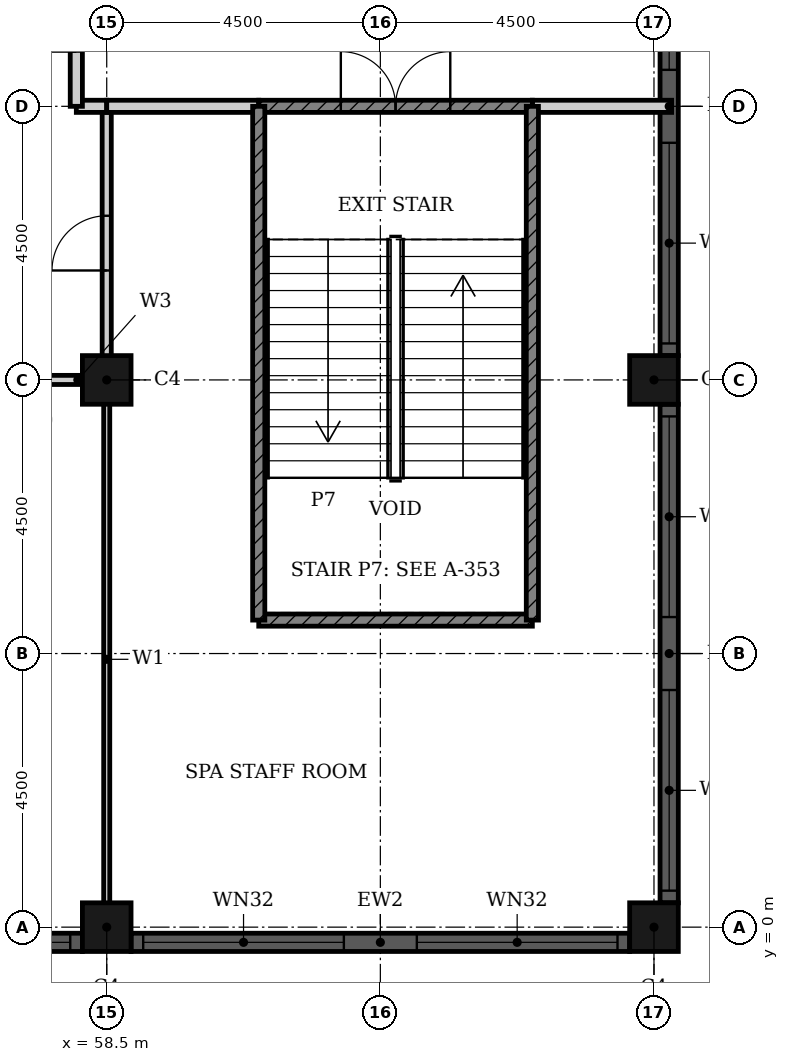
"""IFC4 building model, lengths in metres.
Left out: names, types, materials, properties, quantities, classifications, styles, units other than length and angle.
Written with IfcOpenShell. Run it as: python <this file> out.ifc"""

import sys

from ifc_helpers import new_model, si_unit, direction, frame, frame_2d, origin, origin_2d, place, context, subcontext, project, spatial, rectangle, hollow_rectangle, extrude, element, fill, save


model = new_model("IFC4")
c1 = context("Model", 3, precision=1e-05, world=origin(), true_north=direction((0.0, 1.0)))
c2 = subcontext(c1, "Body", "Model", "MODEL_VIEW")
j1 = project(units=[si_unit("LENGTHUNIT", "METRE"), si_unit("PLANEANGLEUNIT", "RADIAN")], contexts=[c1])
p1 = place(None, origin())
s1 = spatial("IfcSite", under=j1, at=p1, CompositionType="ELEMENT")
p2 = place(p1, origin())
s2 = spatial("IfcBuilding", under=s1, at=p2, CompositionType="ELEMENT")
p3 = place(p2, frame((0.0, 0.0, 24.0)))
s3 = spatial("IfcBuildingStorey", under=s2, at=p3, CompositionType="ELEMENT", Elevation=24.0)
for number, where, z_axis, x_axis in (
    (1, (58.5, 0.0, 0.0), (0.0, 0.0, 1.0), (1.0, 0.0, 0.0)),
    (2, (67.5, 0.0, 0.0), (0.0, 0.0, 1.0), (1.0, 0.0, 0.0)),
    (3, (67.5, 9.0, 0.0), (0.0, 0.0, 1.0), (1.0, 0.0, 0.0)),
    (4, (58.5, 9.0, 0.0), (0.0, 0.0, 1.0), (1.0, 0.0, 0.0)),
):
    element("IfcColumn", number, at=place(p3, frame(where, z_axis=z_axis, x_axis=x_axis)), inside=s3, PredefinedType="COLUMN", context=c2, shape_type="SweptSolid", body=[
        extrude(hollow_rectangle(XDim=0.8, YDim=0.8, WallThickness=0.025, at=origin_2d()), origin(), (0.0, 0.0, 1.0), 4.8),
    ])
p4 = place(p3, frame((67.75, 0.4, 0.0), z_axis=(0.0, 0.0, 1.0), x_axis=(0.0, 1.0, 0.0)))
e5 = element("IfcWall", 5, at=p4, inside=s3, PredefinedType="SOLIDWALL", context=c2, shape_type="SweptSolid", body=[
    extrude(rectangle(XDim=8.2, YDim=0.3, at=frame_2d((4.1, 0.0))), origin(), (0.0, 0.0, 1.0), 4.8),
])
p5 = place(p4, frame((0.2, 0.0, 0.9)))
e6 = element("IfcOpeningElement", 6, at=p5, cuts=e5, PredefinedType="OPENING", context=c2, shape_type="SweptSolid", body=[
    extrude(rectangle(XDim=3.3, YDim=2.9, at=frame_2d((1.65, 1.45))), frame((0.0, 0.16, 0.0), z_axis=(0.0, -1.0, 0.0), x_axis=(1.0, 0.0, 0.0)), (0.0, 0.0, 1.0), 0.32),
])
p6 = place(p4, frame((4.7, 0.0, 0.9)))
e7 = element("IfcOpeningElement", 7, at=p6, cuts=e5, PredefinedType="OPENING", context=c2, shape_type="SweptSolid", body=[
    extrude(rectangle(XDim=3.3, YDim=2.9, at=frame_2d((1.65, 1.45))), frame((0.0, 0.16, 0.0), z_axis=(0.0, -1.0, 0.0), x_axis=(1.0, 0.0, 0.0)), (0.0, 0.0, 1.0), 0.32),
])
p7 = place(p3, frame((67.75, 9.4, 0.0), z_axis=(0.0, 0.0, 1.0), x_axis=(0.0, 1.0, 0.0)))
e8 = element("IfcWall", 8, at=p7, inside=s3, PredefinedType="SOLIDWALL", context=c2, shape_type="SweptSolid", body=[
    extrude(rectangle(XDim=8.2, YDim=0.3, at=frame_2d((4.1, 0.0))), origin(), (0.0, 0.0, 1.0), 4.8),
])
p8 = place(p7, frame((0.2, 0.0, 0.9)))
e9 = element("IfcOpeningElement", 9, at=p8, cuts=e8, PredefinedType="OPENING", context=c2, shape_type="SweptSolid", body=[
    extrude(rectangle(XDim=3.3, YDim=2.9, at=frame_2d((1.65, 1.45))), frame((0.0, 0.16, 0.0), z_axis=(0.0, -1.0, 0.0), x_axis=(1.0, 0.0, 0.0)), (0.0, 0.0, 1.0), 0.32),
])
p9 = place(p7, frame((4.7, 0.0, 0.9)))
e10 = element("IfcOpeningElement", 10, at=p9, cuts=e8, PredefinedType="OPENING", context=c2, shape_type="SweptSolid", body=[
    extrude(rectangle(XDim=3.3, YDim=2.9, at=frame_2d((1.65, 1.45))), frame((0.0, 0.16, 0.0), z_axis=(0.0, -1.0, 0.0), x_axis=(1.0, 0.0, 0.0)), (0.0, 0.0, 1.0), 0.32),
])
p10 = place(p3, frame((49.9, -0.25, 0.0), z_axis=(0.0, 0.0, 1.0), x_axis=(1.0, 0.0, 0.0)))
e11 = element("IfcWall", 11, at=p10, inside=s3, PredefinedType="SOLIDWALL", context=c2, shape_type="SweptSolid", body=[
    extrude(rectangle(XDim=8.2, YDim=0.3, at=frame_2d((4.1, 0.0))), origin(), (0.0, 0.0, 1.0), 4.8),
])
p11 = place(p10, frame((0.2, 0.0, 0.9)))
e12 = element("IfcOpeningElement", 12, at=p11, cuts=e11, PredefinedType="OPENING", context=c2, shape_type="SweptSolid", body=[
    extrude(rectangle(XDim=3.3, YDim=2.9, at=frame_2d((1.65, 1.45))), frame((0.0, 0.16, 0.0), z_axis=(0.0, -1.0, 0.0), x_axis=(1.0, 0.0, 0.0)), (0.0, 0.0, 1.0), 0.32),
])
p12 = place(p10, frame((4.7, 0.0, 0.9)))
e13 = element("IfcOpeningElement", 13, at=p12, cuts=e11, PredefinedType="OPENING", context=c2, shape_type="SweptSolid", body=[
    extrude(rectangle(XDim=3.3, YDim=2.9, at=frame_2d((1.65, 1.45))), frame((0.0, 0.16, 0.0), z_axis=(0.0, -1.0, 0.0), x_axis=(1.0, 0.0, 0.0)), (0.0, 0.0, 1.0), 0.32),
])
p13 = place(p3, frame((58.9, -0.25, 0.0), z_axis=(0.0, 0.0, 1.0), x_axis=(1.0, 0.0, 0.0)))
e14 = element("IfcWall", 14, at=p13, inside=s3, PredefinedType="SOLIDWALL", context=c2, shape_type="SweptSolid", body=[
    extrude(rectangle(XDim=8.2, YDim=0.3, at=frame_2d((4.1, 0.0))), origin(), (0.0, 0.0, 1.0), 4.8),
])
p14 = place(p13, frame((0.2, 0.0, 0.9)))
e15 = element("IfcOpeningElement", 15, at=p14, cuts=e14, PredefinedType="OPENING", context=c2, shape_type="SweptSolid", body=[
    extrude(rectangle(XDim=3.3, YDim=2.9, at=frame_2d((1.65, 1.45))), frame((0.0, 0.16, 0.0), z_axis=(0.0, -1.0, 0.0), x_axis=(1.0, 0.0, 0.0)), (0.0, 0.0, 1.0), 0.32),
])
p15 = place(p13, frame((4.7, 0.0, 0.9)))
e16 = element("IfcOpeningElement", 16, at=p15, cuts=e14, PredefinedType="OPENING", context=c2, shape_type="SweptSolid", body=[
    extrude(rectangle(XDim=3.3, YDim=2.9, at=frame_2d((1.65, 1.45))), frame((0.0, 0.16, 0.0), z_axis=(0.0, -1.0, 0.0), x_axis=(1.0, 0.0, 0.0)), (0.0, 0.0, 1.0), 0.32),
])
p16 = place(p3, frame((55.4, 9.0, 0.0), z_axis=(0.0, 0.0, 1.0), x_axis=(1.0, 0.0, 0.0)))
e17 = element("IfcWall", 17, at=p16, inside=s3, PredefinedType="PARTITIONING", context=c2, shape_type="SweptSolid", body=[
    extrude(rectangle(XDim=3.1, YDim=0.15, at=frame_2d((1.55, 0.0))), origin(), (0.0, 0.0, 1.0), 4.45),
])
p17 = place(p16, frame((0.95, 0.0, 0.0)))
e18 = element("IfcOpeningElement", 18, at=p17, cuts=e17, PredefinedType="OPENING", context=c2, shape_type="SweptSolid", body=[
    extrude(rectangle(XDim=1.2, YDim=2.4, at=frame_2d((0.6, 1.2))), frame((0.0, 0.085, 0.0), z_axis=(0.0, -1.0, 0.0), x_axis=(1.0, 0.0, 0.0)), (0.0, 0.0, 1.0), 0.17),
])
p18 = place(p3, frame((58.5, 9.0, 0.0), z_axis=(0.0, 0.0, 1.0), x_axis=(0.0, 1.0, 0.0)))
e19 = element("IfcWall", 19, at=p18, inside=s3, PredefinedType="PARTITIONING", context=c2, shape_type="SweptSolid", body=[
    extrude(rectangle(XDim=4.5, YDim=0.15, at=frame_2d((2.25, 0.0))), origin(), (0.0, 0.0, 1.0), 4.45),
])
p19 = place(p18, frame((1.8, 0.0, 0.0)))
e20 = element("IfcOpeningElement", 20, at=p19, cuts=e19, PredefinedType="OPENING", context=c2, shape_type="SweptSolid", body=[
    extrude(rectangle(XDim=0.9, YDim=2.1, at=frame_2d((0.45, 1.05))), frame((0.0, 0.085, 0.0), z_axis=(0.0, -1.0, 0.0), x_axis=(1.0, 0.0, 0.0)), (0.0, 0.0, 1.0), 0.17),
])
p20 = place(p3, frame((58.5, -0.19, 0.0), z_axis=(0.0, 0.0, 1.0), x_axis=(0.0, 1.0, 0.0)))
e21 = element("IfcWall", 21, at=p20, inside=s3, PredefinedType="PARTITIONING", context=c2, shape_type="SweptSolid", body=[
    extrude(rectangle(XDim=9.19, YDim=0.1, at=frame_2d((4.595, 0.0))), origin(), (0.0, 0.0, 1.0), 4.45),
])
p21 = place(p3, frame((58.0, 13.5, 0.0), z_axis=(0.0, 0.0, 1.0), x_axis=(1.0, 0.0, 0.0)))
e22 = element("IfcWall", 22, at=p21, inside=s3, PredefinedType="PARTITIONING", context=c2, shape_type="SweptSolid", body=[
    extrude(rectangle(XDim=0.5, YDim=0.2, at=frame_2d((0.25, 0.0))), origin(), (0.0, 0.0, 1.0), 4.45),
])
p22 = place(p3, frame((58.5, 13.5, 0.0), z_axis=(0.0, 0.0, 1.0), x_axis=(1.0, 0.0, 0.0)))
e23 = element("IfcWall", 23, at=p22, inside=s3, PredefinedType="PARTITIONING", context=c2, shape_type="SweptSolid", body=[
    extrude(rectangle(XDim=2.5, YDim=0.2, at=frame_2d((1.25, 0.0))), origin(), (0.0, 0.0, 1.0), 4.45),
])
p23 = place(p3, frame((65.5, 13.5, 0.0), z_axis=(0.0, 0.0, 1.0), x_axis=(1.0, 0.0, 0.0)))
e24 = element("IfcWall", 24, at=p23, inside=s3, PredefinedType="PARTITIONING", context=c2, shape_type="SweptSolid", body=[
    extrude(rectangle(XDim=2.29, YDim=0.2, at=frame_2d((1.145, 0.0))), origin(), (0.0, 0.0, 1.0), 4.45),
])
p24 = place(p3, frame((58.0, 13.5, 0.0), z_axis=(0.0, 0.0, 1.0), x_axis=(0.0, 1.0, 0.0)))
e25 = element("IfcWall", 25, at=p24, inside=s3, PredefinedType="PARTITIONING", context=c2, shape_type="SweptSolid", body=[
    extrude(rectangle(XDim=3.0, YDim=0.2, at=frame_2d((1.5, 0.0))), origin(), (0.0, 0.0, 1.0), 4.45),
])
p25 = place(p24, frame((0.9, 0.0, 0.0)))
e26 = element("IfcOpeningElement", 26, at=p25, cuts=e25, PredefinedType="OPENING", context=c2, shape_type="SweptSolid", body=[
    extrude(rectangle(XDim=1.2, YDim=2.1, at=frame_2d((0.6, 1.05))), frame((0.0, 0.11, 0.0), z_axis=(0.0, -1.0, 0.0), x_axis=(1.0, 0.0, 0.0)), (0.0, 0.0, 1.0), 0.22),
])
p26 = place(p3, frame((61.0, 13.5, 0.0), z_axis=(0.0, 0.0, 1.0), x_axis=(1.0, 0.0, 0.0)))
e27 = element("IfcWall", 27, at=p26, inside=s3, PredefinedType="SHEAR", context=c2, shape_type="SweptSolid", body=[
    extrude(rectangle(XDim=4.5, YDim=0.2, at=frame_2d((2.25, 0.0))), origin(), (0.0, 0.0, 1.0), 4.45),
])
p27 = place(p26, frame((1.35, 0.0, 0.0)))
e28 = element("IfcOpeningElement", 28, at=p27, cuts=e27, PredefinedType="OPENING", context=c2, shape_type="SweptSolid", body=[
    extrude(rectangle(XDim=1.8, YDim=2.1, at=frame_2d((0.9, 1.05))), frame((0.0, 0.11, 0.0), z_axis=(0.0, -1.0, 0.0), x_axis=(1.0, 0.0, 0.0)), (0.0, 0.0, 1.0), 0.22),
])
p28 = place(p3, frame((61.0, 5.05, 0.0), z_axis=(0.0, 0.0, 1.0), x_axis=(1.0, 0.0, 0.0)))
e29 = element("IfcWall", 29, at=p28, inside=s3, PredefinedType="SHEAR", context=c2, shape_type="SweptSolid", body=[
    extrude(rectangle(XDim=4.5, YDim=0.2, at=frame_2d((2.25, 0.0))), origin(), (0.0, 0.0, 1.0), 4.45),
])
for number, where, z_axis, x_axis in (
    (30, (61.0, 5.05, 0.0), (0.0, 0.0, 1.0), (0.0, 1.0, 0.0)),
    (31, (65.5, 5.05, 0.0), (0.0, 0.0, 1.0), (0.0, 1.0, 0.0)),
):
    element("IfcWall", number, at=place(p3, frame(where, z_axis=z_axis, x_axis=x_axis)), inside=s3, PredefinedType="SHEAR", context=c2, shape_type="SweptSolid", body=[
        extrude(rectangle(XDim=8.45, YDim=0.2, at=frame_2d((4.225, 0.0))), origin(), (0.0, 0.0, 1.0), 4.45),
    ])
p29 = place(p5, origin())
e32 = element("IfcWindow", 32, at=p29, inside=s3, PartitioningType="SINGLE_PANEL", PredefinedType="WINDOW", context=c2, shape_type="SweptSolid", body=[
    extrude(rectangle(XDim=3.3, YDim=2.9, at=frame_2d((1.65, 1.45))), frame((0.0, 0.03, 0.0), z_axis=(0.0, -1.0, 0.0), x_axis=(1.0, 0.0, 0.0)), (0.0, 0.0, 1.0), 0.06),
])
fill(e6, e32)
p30 = place(p6, origin())
e33 = element("IfcWindow", 33, at=p30, inside=s3, PartitioningType="SINGLE_PANEL", PredefinedType="WINDOW", context=c2, shape_type="SweptSolid", body=[
    extrude(rectangle(XDim=3.3, YDim=2.9, at=frame_2d((1.65, 1.45))), frame((0.0, 0.03, 0.0), z_axis=(0.0, -1.0, 0.0), x_axis=(1.0, 0.0, 0.0)), (0.0, 0.0, 1.0), 0.06),
])
fill(e7, e33)
p31 = place(p8, origin())
e34 = element("IfcWindow", 34, at=p31, inside=s3, PartitioningType="SINGLE_PANEL", PredefinedType="WINDOW", context=c2, shape_type="SweptSolid", body=[
    extrude(rectangle(XDim=3.3, YDim=2.9, at=frame_2d((1.65, 1.45))), frame((0.0, 0.03, 0.0), z_axis=(0.0, -1.0, 0.0), x_axis=(1.0, 0.0, 0.0)), (0.0, 0.0, 1.0), 0.06),
])
fill(e9, e34)
p32 = place(p9, origin())
e35 = element("IfcWindow", 35, at=p32, inside=s3, PartitioningType="SINGLE_PANEL", PredefinedType="WINDOW", context=c2, shape_type="SweptSolid", body=[
    extrude(rectangle(XDim=3.3, YDim=2.9, at=frame_2d((1.65, 1.45))), frame((0.0, 0.03, 0.0), z_axis=(0.0, -1.0, 0.0), x_axis=(1.0, 0.0, 0.0)), (0.0, 0.0, 1.0), 0.06),
])
fill(e10, e35)
p33 = place(p12, origin())
e36 = element("IfcWindow", 36, at=p33, inside=s3, PartitioningType="SINGLE_PANEL", PredefinedType="WINDOW", context=c2, shape_type="SweptSolid", body=[
    extrude(rectangle(XDim=3.3, YDim=2.9, at=frame_2d((1.65, 1.45))), frame((0.0, 0.03, 0.0), z_axis=(0.0, -1.0, 0.0), x_axis=(1.0, 0.0, 0.0)), (0.0, 0.0, 1.0), 0.06),
])
fill(e13, e36)
p34 = place(p14, origin())
e37 = element("IfcWindow", 37, at=p34, inside=s3, PartitioningType="SINGLE_PANEL", PredefinedType="WINDOW", context=c2, shape_type="SweptSolid", body=[
    extrude(rectangle(XDim=3.3, YDim=2.9, at=frame_2d((1.65, 1.45))), frame((0.0, 0.03, 0.0), z_axis=(0.0, -1.0, 0.0), x_axis=(1.0, 0.0, 0.0)), (0.0, 0.0, 1.0), 0.06),
])
fill(e15, e37)
p35 = place(p15, origin())
e38 = element("IfcWindow", 38, at=p35, inside=s3, PartitioningType="SINGLE_PANEL", PredefinedType="WINDOW", context=c2, shape_type="SweptSolid", body=[
    extrude(rectangle(XDim=3.3, YDim=2.9, at=frame_2d((1.65, 1.45))), frame((0.0, 0.03, 0.0), z_axis=(0.0, -1.0, 0.0), x_axis=(1.0, 0.0, 0.0)), (0.0, 0.0, 1.0), 0.06),
])
fill(e16, e38)
p36 = place(p27, origin())
e39 = element("IfcDoor", 39, at=p36, inside=s3, OperationType="DOUBLE_DOOR_SINGLE_SWING", PredefinedType="DOOR", context=c2, shape_type="SweptSolid", body=[
    extrude(rectangle(XDim=1.8, YDim=2.1, at=frame_2d((0.9, 1.05))), frame((0.0, 0.025, 0.0), z_axis=(0.0, -1.0, 0.0), x_axis=(1.0, 0.0, 0.0)), (0.0, 0.0, 1.0), 0.05),
])
fill(e28, e39)
p37 = place(p19, origin())
e40 = element("IfcDoor", 40, at=p37, inside=s3, OperationType="SINGLE_SWING_LEFT", PredefinedType="DOOR", context=c2, shape_type="SweptSolid", body=[
    extrude(rectangle(XDim=0.9, YDim=2.1, at=frame_2d((0.45, 1.05))), frame((0.0, 0.025, 0.0), z_axis=(0.0, -1.0, 0.0), x_axis=(1.0, 0.0, 0.0)), (0.0, 0.0, 1.0), 0.05),
])
fill(e20, e40)
save(model, sys.argv[1])
